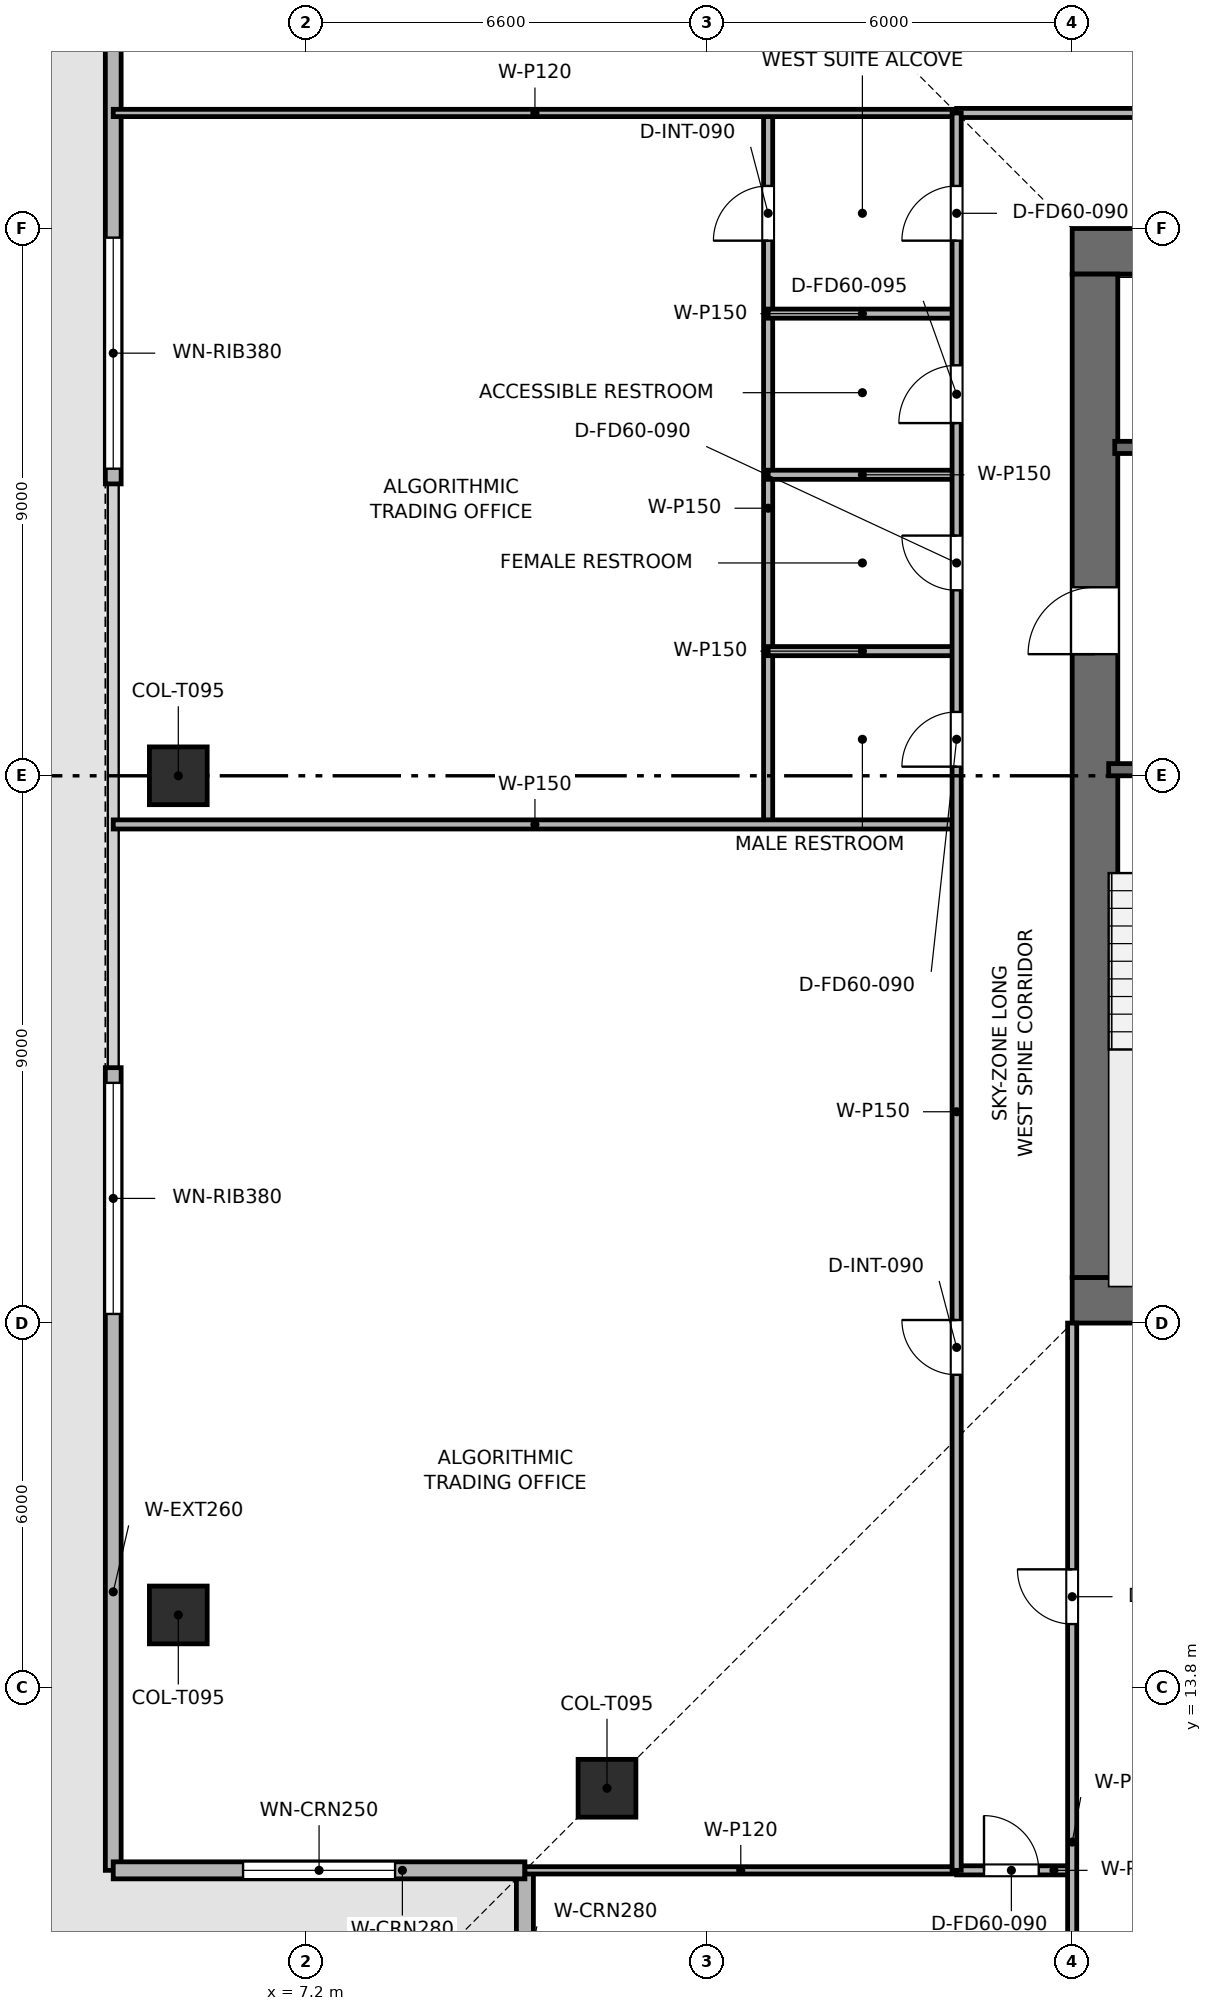
"""IFC4 building model, lengths in metres.
Left out: names, types, materials, properties, quantities, classifications, styles, units other than length and angle.
Written with IfcOpenShell. Run it as: python <this file> out.ifc"""

import sys

from ifc_helpers import new_model, si_unit, direction, frame, frame_2d, origin, origin_2d, place, context, subcontext, project, spatial, rectangle, extrude, element, fill, save


model = new_model("IFC4")
c1 = context("Model", 3, precision=1e-05, world=origin(), true_north=direction((0.0, 1.0)))
c2 = subcontext(c1, "Body", "Model", "MODEL_VIEW")
j1 = project(units=[si_unit("LENGTHUNIT", "METRE"), si_unit("PLANEANGLEUNIT", "RADIAN")], contexts=[c1])
p1 = place(None, origin())
s1 = spatial("IfcSite", under=j1, at=p1, CompositionType="ELEMENT")
p2 = place(p1, origin())
s2 = spatial("IfcBuilding", under=s1, at=p2, CompositionType="ELEMENT")
p3 = place(p2, frame((0.0, 0.0, 246.6)))
s3 = spatial("IfcBuildingStorey", under=s2, at=p3, CompositionType="ELEMENT", Elevation=246.6)
p4 = place(p3, frame((19.8, 20.175, 0.0), z_axis=(0.0, 0.0, 1.0), x_axis=(1.0, 0.0, 0.0)))
e1 = element("IfcWall", 1, at=p4, inside=s3, PredefinedType="SHEAR", context=c2, shape_type="SweptSolid", body=[
    extrude(rectangle(XDim=18.0, YDim=0.75, at=frame_2d((9.0, 0.0))), origin(), (0.0, 0.0, 1.0), 3.75),
])
p5 = place(p3, frame((19.8, 37.425, 0.0), z_axis=(0.0, 0.0, 1.0), x_axis=(1.0, 0.0, 0.0)))
e2 = element("IfcWall", 2, at=p5, inside=s3, PredefinedType="SHEAR", context=c2, shape_type="SweptSolid", body=[
    extrude(rectangle(XDim=18.0, YDim=0.75, at=frame_2d((9.0, 0.0))), origin(), (0.0, 0.0, 1.0), 3.75),
])
p6 = place(p5, frame((7.05, 0.0, 0.0)))
e3 = element("IfcOpeningElement", 3, at=p6, cuts=e2, PredefinedType="OPENING", context=c2, shape_type="SweptSolid", body=[
    extrude(rectangle(XDim=1.1, YDim=2.15, at=frame_2d((0.55, 1.075))), frame((0.0, 0.385, 0.0), z_axis=(0.0, -1.0, 0.0), x_axis=(1.0, 0.0, 0.0)), (0.0, 0.0, 1.0), 0.77),
])
p7 = place(p3, frame((20.175, 20.55, 0.0), z_axis=(0.0, 0.0, 1.0), x_axis=(0.0, 1.0, 0.0)))
e4 = element("IfcWall", 4, at=p7, inside=s3, PredefinedType="SHEAR", context=c2, shape_type="SweptSolid", body=[
    extrude(rectangle(XDim=16.5, YDim=0.75, at=frame_2d((8.25, 0.0))), origin(), (0.0, 0.0, 1.0), 3.75),
])
p8 = place(p7, frame((10.25, 0.0, 0.0)))
e5 = element("IfcOpeningElement", 5, at=p8, cuts=e4, PredefinedType="OPENING", context=c2, shape_type="SweptSolid", body=[
    extrude(rectangle(XDim=1.1, YDim=2.15, at=frame_2d((0.55, 1.075))), frame((0.0, 0.385, 0.0), z_axis=(0.0, -1.0, 0.0), x_axis=(1.0, 0.0, 0.0)), (0.0, 0.0, 1.0), 0.77),
])
for number, where, z_axis, x_axis in (
    (6, (5.1, 28.8, 0.003), (0.0, 0.0, 1.0), (1.0, 0.0, 0.0)),
    (7, (5.1, 15.0, 0.003), (0.0, 0.0, 1.0), (1.0, 0.0, 0.0)),
    (8, (12.15, 12.15, 0.003), (0.0, 0.0, 1.0), (1.0, 0.0, 0.0)),
):
    element("IfcColumn", number, at=place(p3, frame(where, z_axis=z_axis, x_axis=x_axis)), inside=s3, PredefinedType="COLUMN", context=c2, shape_type="SweptSolid", body=[
        extrude(rectangle(XDim=0.95, YDim=0.95, at=origin_2d()), origin(), (0.0, 0.0, 1.0), 3.494),
    ])
p9 = place(p3, frame((4.03, 10.8, 0.0), z_axis=(0.0, 0.0, 1.0), x_axis=(0.0, 1.0, 0.0)))
e9 = element("IfcWall", 9, at=p9, inside=s3, PredefinedType="SOLIDWALL", context=c2, shape_type="SweptSolid", body=[
    extrude(rectangle(XDim=13.2, YDim=0.26, at=frame_2d((6.6, 0.0))), origin(), (0.0, 0.0, 1.0), 3.5),
])
p10 = place(p9, frame((9.15, 0.0, 0.9)))
e10 = element("IfcOpeningElement", 10, at=p10, cuts=e9, PredefinedType="OPENING", context=c2, shape_type="SweptSolid", body=[
    extrude(rectangle(XDim=3.8, YDim=1.9, at=frame_2d((1.9, 0.95))), frame((0.0, 0.14, 0.0), z_axis=(0.0, -1.0, 0.0), x_axis=(1.0, 0.0, 0.0)), (0.0, 0.0, 1.0), 0.28),
])
p11 = place(p3, frame((4.03, 33.6, 0.0), z_axis=(0.0, 0.0, 1.0), x_axis=(0.0, 1.0, 0.0)))
e11 = element("IfcWall", 11, at=p11, inside=s3, PredefinedType="SOLIDWALL", context=c2, shape_type="SweptSolid", body=[
    extrude(rectangle(XDim=13.2, YDim=0.26, at=frame_2d((6.6, 0.0))), origin(), (0.0, 0.0, 1.0), 3.5),
])
p12 = place(p11, frame((0.25, 0.0, 0.9)))
e12 = element("IfcOpeningElement", 12, at=p12, cuts=e11, PredefinedType="OPENING", context=c2, shape_type="SweptSolid", body=[
    extrude(rectangle(XDim=3.8, YDim=1.9, at=frame_2d((1.9, 0.95))), frame((0.0, 0.14, 0.0), z_axis=(0.0, -1.0, 0.0), x_axis=(1.0, 0.0, 0.0)), (0.0, 0.0, 1.0), 0.28),
])
p13 = place(p3, frame((10.8, 4.03, 0.0), z_axis=(0.0, 0.0, 1.0), x_axis=(0.0, 1.0, 0.0)))
e13 = element("IfcWall", 13, at=p13, inside=s3, PredefinedType="SOLIDWALL", context=c2, shape_type="SweptSolid", body=[
    extrude(rectangle(XDim=6.77, YDim=0.28, at=frame_2d((3.385, 0.0))), origin(), (0.0, 0.0, 1.0), 3.5),
])
p14 = place(p13, frame((2.135, 0.0, 0.9)))
e14 = element("IfcOpeningElement", 14, at=p14, cuts=e13, PredefinedType="OPENING", context=c2, shape_type="SweptSolid", body=[
    extrude(rectangle(XDim=2.5, YDim=1.9, at=frame_2d((1.25, 0.95))), frame((0.0, 0.15, 0.0), z_axis=(0.0, -1.0, 0.0), x_axis=(1.0, 0.0, 0.0)), (0.0, 0.0, 1.0), 0.3),
])
p15 = place(p3, frame((10.8, 10.8, 0.0), z_axis=(0.0, 0.0, 1.0), x_axis=(-1.0, 0.0, 0.0)))
e15 = element("IfcWall", 15, at=p15, inside=s3, PredefinedType="SOLIDWALL", context=c2, shape_type="SweptSolid", body=[
    extrude(rectangle(XDim=6.77, YDim=0.28, at=frame_2d((3.385, 0.0))), origin(), (0.0, 0.0, 1.0), 3.5),
])
p16 = place(p15, frame((2.135, 0.0, 0.9)))
e16 = element("IfcOpeningElement", 16, at=p16, cuts=e15, PredefinedType="OPENING", context=c2, shape_type="SweptSolid", body=[
    extrude(rectangle(XDim=2.5, YDim=1.9, at=frame_2d((1.25, 0.95))), frame((0.0, 0.15, 0.0), z_axis=(0.0, -1.0, 0.0), x_axis=(1.0, 0.0, 0.0)), (0.0, 0.0, 1.0), 0.3),
])
p17 = place(p3, frame((20.4, 28.9, 0.0), z_axis=(0.0, 0.0, 1.0), x_axis=(1.0, 0.0, 0.0)))
e17 = element("IfcWall", 17, at=p17, inside=s3, PredefinedType="SHEAR", context=c2, shape_type="SweptSolid", body=[
    extrude(rectangle(XDim=3.15, YDim=0.2, at=frame_2d((1.575, 0.0))), origin(), (0.0, 0.0, 1.0), 3.5),
])
p18 = place(p17, frame((0.8, 0.0, 0.0)))
e18 = element("IfcOpeningElement", 18, at=p18, cuts=e17, PredefinedType="OPENING", context=c2, shape_type="SweptSolid", body=[
    extrude(rectangle(XDim=1.0, YDim=2.1, at=frame_2d((0.5, 1.05))), frame((0.0, 0.11, 0.0), z_axis=(0.0, -1.0, 0.0), x_axis=(1.0, 0.0, 0.0)), (0.0, 0.0, 1.0), 0.22),
])
p19 = place(p3, frame((20.5, 34.2, 0.0), z_axis=(0.0, 0.0, 1.0), x_axis=(1.0, 0.0, 0.0)))
e19 = element("IfcWall", 19, at=p19, inside=s3, PredefinedType="SHEAR", context=c2, shape_type="SweptSolid", body=[
    extrude(rectangle(XDim=3.05, YDim=0.2, at=frame_2d((1.525, 0.0))), origin(), (0.0, 0.0, 1.0), 3.5),
])
p20 = place(p19, frame((0.75, 0.0, 0.0)))
e20 = element("IfcOpeningElement", 20, at=p20, cuts=e19, PredefinedType="OPENING", context=c2, shape_type="SweptSolid", body=[
    extrude(rectangle(XDim=1.1, YDim=2.15, at=frame_2d((0.55, 1.075))), frame((0.0, 0.11, 0.0), z_axis=(0.0, -1.0, 0.0), x_axis=(1.0, 0.0, 0.0)), (0.0, 0.0, 1.0), 0.22),
])
p21 = place(p3, frame((14.8, 28.0, 0.0), z_axis=(0.0, 0.0, 1.0), x_axis=(0.0, 1.0, 0.0)))
e21 = element("IfcWall", 21, at=p21, inside=s3, PredefinedType="PARTITIONING", context=c2, shape_type="SweptSolid", body=[
    extrude(rectangle(XDim=11.7, YDim=0.15, at=frame_2d((5.85, 0.0))), origin(), (0.0, 0.0, 1.0), 3.085),
])
p22 = place(p21, frame((9.6, 0.0, 0.0)))
e22 = element("IfcOpeningElement", 22, at=p22, cuts=e21, PredefinedType="OPENING", context=c2, shape_type="SweptSolid", body=[
    extrude(rectangle(XDim=0.9, YDim=2.1, at=frame_2d((0.45, 1.05))), frame((0.0, 0.085, 0.0), z_axis=(0.0, -1.0, 0.0), x_axis=(1.0, 0.0, 0.0)), (0.0, 0.0, 1.0), 0.17),
])
p23 = place(p3, frame((4.03, 28.0, 0.0), z_axis=(0.0, 0.0, 1.0), x_axis=(1.0, 0.0, 0.0)))
e23 = element("IfcWall", 23, at=p23, inside=s3, PredefinedType="PARTITIONING", context=c2, shape_type="SweptSolid", body=[
    extrude(rectangle(XDim=13.87, YDim=0.15, at=frame_2d((6.935, 0.0))), origin(), (0.0, 0.0, 1.0), 3.085),
])
for number, where, z_axis, x_axis in (
    (24, (14.8, 36.4, 0.0), (0.0, 0.0, 1.0), (1.0, 0.0, 0.0)),
    (25, (14.8, 30.85, 0.0), (0.0, 0.0, 1.0), (1.0, 0.0, 0.0)),
    (26, (14.8, 33.75, 0.0), (0.0, 0.0, 1.0), (1.0, 0.0, 0.0)),
):
    element("IfcWall", number, at=place(p3, frame(where, z_axis=z_axis, x_axis=x_axis)), inside=s3, PredefinedType="PARTITIONING", context=c2, shape_type="SweptSolid", body=[
        extrude(rectangle(XDim=3.1, YDim=0.15, at=frame_2d((1.55, 0.0))), origin(), (0.0, 0.0, 1.0), 3.5),
    ])
p24 = place(p3, frame((10.8, 10.8, 0.0), z_axis=(0.0, 0.0, 1.0), x_axis=(1.0, 0.0, 0.0)))
e27 = element("IfcWall", 27, at=p24, inside=s3, PredefinedType="PARTITIONING", context=c2, shape_type="SweptSolid", body=[
    extrude(rectangle(XDim=7.1, YDim=0.12, at=frame_2d((3.55, 0.0))), origin(), (0.0, 0.0, 1.0), 3.085),
])
p25 = place(p3, frame((17.9, 10.8, 0.0), z_axis=(0.0, 0.0, 1.0), x_axis=(1.0, 0.0, 0.0)))
e28 = element("IfcWall", 28, at=p25, inside=s3, PredefinedType="PARTITIONING", context=c2, shape_type="SweptSolid", body=[
    extrude(rectangle(XDim=1.9, YDim=0.15, at=frame_2d((0.95, 0.0))), origin(), (0.0, 0.0, 1.0), 3.5),
])
p26 = place(p25, frame((0.45, 0.0, 0.0)))
e29 = element("IfcOpeningElement", 29, at=p26, cuts=e28, PredefinedType="OPENING", context=c2, shape_type="SweptSolid", body=[
    extrude(rectangle(XDim=0.9, YDim=2.1, at=frame_2d((0.45, 1.05))), frame((0.0, 0.085, 0.0), z_axis=(0.0, -1.0, 0.0), x_axis=(1.0, 0.0, 0.0)), (0.0, 0.0, 1.0), 0.17),
])
p27 = place(p3, frame((19.8, 4.03, 0.0), z_axis=(0.0, 0.0, 1.0), x_axis=(0.0, 1.0, 0.0)))
e30 = element("IfcWall", 30, at=p27, inside=s3, PredefinedType="PARTITIONING", context=c2, shape_type="SweptSolid", body=[
    extrude(rectangle(XDim=15.77, YDim=0.15, at=frame_2d((7.885, 0.0))), origin(), (0.0, 0.0, 1.0), 3.085),
])
p28 = place(p27, frame((10.82, 0.0, 0.0)))
e31 = element("IfcOpeningElement", 31, at=p28, cuts=e30, PredefinedType="OPENING", context=c2, shape_type="SweptSolid", body=[
    extrude(rectangle(XDim=0.9, YDim=2.1, at=frame_2d((0.45, 1.05))), frame((0.0, 0.085, 0.0), z_axis=(0.0, -1.0, 0.0), x_axis=(1.0, 0.0, 0.0)), (0.0, 0.0, 1.0), 0.17),
])
p29 = place(p3, frame((4.03, 39.7, 0.0), z_axis=(0.0, 0.0, 1.0), x_axis=(1.0, 0.0, 0.0)))
e32 = element("IfcWall", 32, at=p29, inside=s3, PredefinedType="PARTITIONING", context=c2, shape_type="SweptSolid", body=[
    extrude(rectangle(XDim=13.87, YDim=0.12, at=frame_2d((6.935, 0.0))), origin(), (0.0, 0.0, 1.0), 3.085),
])
p30 = place(p3, frame((17.9, 39.7, 0.0), z_axis=(0.0, 0.0, 1.0), x_axis=(1.0, 0.0, 0.0)))
e33 = element("IfcWall", 33, at=p30, inside=s3, PredefinedType="PARTITIONING", context=c2, shape_type="SweptSolid", body=[
    extrude(rectangle(XDim=21.8, YDim=0.15, at=frame_2d((10.9, 0.0))), origin(), (0.0, 0.0, 1.0), 3.085),
])
p31 = place(p30, frame((10.45, 0.0, 0.0)))
e34 = element("IfcOpeningElement", 34, at=p31, cuts=e33, PredefinedType="OPENING", context=c2, shape_type="SweptSolid", body=[
    extrude(rectangle(XDim=0.9, YDim=2.1, at=frame_2d((0.45, 1.05))), frame((0.0, 0.085, 0.0), z_axis=(0.0, -1.0, 0.0), x_axis=(1.0, 0.0, 0.0)), (0.0, 0.0, 1.0), 0.17),
])
p32 = place(p3, frame((17.9, 10.8, 0.0), z_axis=(0.0, 0.0, 1.0), x_axis=(0.0, 1.0, 0.0)))
e35 = element("IfcWall", 35, at=p32, inside=s3, PredefinedType="PARTITIONING", context=c2, shape_type="SweptSolid", body=[
    extrude(rectangle(XDim=28.9, YDim=0.15, at=frame_2d((14.45, 0.0))), origin(), (0.0, 0.0, 1.0), 3.085),
])
p33 = place(p32, frame((8.15, 0.0, 0.0)))
e36 = element("IfcOpeningElement", 36, at=p33, cuts=e35, PredefinedType="OPENING", context=c2, shape_type="SweptSolid", body=[
    extrude(rectangle(XDim=0.9, YDim=2.1, at=frame_2d((0.45, 1.05))), frame((0.0, 0.085, 0.0), z_axis=(0.0, -1.0, 0.0), x_axis=(1.0, 0.0, 0.0)), (0.0, 0.0, 1.0), 0.17),
])
p34 = place(p32, frame((18.15, 0.0, 0.0)))
e37 = element("IfcOpeningElement", 37, at=p34, cuts=e35, PredefinedType="OPENING", context=c2, shape_type="SweptSolid", body=[
    extrude(rectangle(XDim=0.9, YDim=2.1, at=frame_2d((0.45, 1.05))), frame((0.0, 0.085, 0.0), z_axis=(0.0, -1.0, 0.0), x_axis=(1.0, 0.0, 0.0)), (0.0, 0.0, 1.0), 0.17),
])
p35 = place(p32, frame((21.05, 0.0, 0.0)))
e38 = element("IfcOpeningElement", 38, at=p35, cuts=e35, PredefinedType="OPENING", context=c2, shape_type="SweptSolid", body=[
    extrude(rectangle(XDim=0.9, YDim=2.1, at=frame_2d((0.45, 1.05))), frame((0.0, 0.085, 0.0), z_axis=(0.0, -1.0, 0.0), x_axis=(1.0, 0.0, 0.0)), (0.0, 0.0, 1.0), 0.17),
])
p36 = place(p32, frame((23.8, 0.0, 0.0)))
e39 = element("IfcOpeningElement", 39, at=p36, cuts=e35, PredefinedType="OPENING", context=c2, shape_type="SweptSolid", body=[
    extrude(rectangle(XDim=0.95, YDim=2.1, at=frame_2d((0.475, 1.05))), frame((0.0, 0.085, 0.0), z_axis=(0.0, -1.0, 0.0), x_axis=(1.0, 0.0, 0.0)), (0.0, 0.0, 1.0), 0.17),
])
p37 = place(p32, frame((26.8, 0.0, 0.0)))
e40 = element("IfcOpeningElement", 40, at=p37, cuts=e35, PredefinedType="OPENING", context=c2, shape_type="SweptSolid", body=[
    extrude(rectangle(XDim=0.9, YDim=2.1, at=frame_2d((0.45, 1.05))), frame((0.0, 0.085, 0.0), z_axis=(0.0, -1.0, 0.0), x_axis=(1.0, 0.0, 0.0)), (0.0, 0.0, 1.0), 0.17),
])
p38 = place(p10, origin())
e41 = element("IfcWindow", 41, at=p38, inside=s3, PartitioningType="SINGLE_PANEL", PredefinedType="WINDOW", context=c2, shape_type="SweptSolid", body=[
    extrude(rectangle(XDim=3.8, YDim=1.9, at=frame_2d((1.9, 0.95))), frame((0.0, 0.03, 0.0), z_axis=(0.0, -1.0, 0.0), x_axis=(1.0, 0.0, 0.0)), (0.0, 0.0, 1.0), 0.06),
])
fill(e10, e41)
p39 = place(p12, origin())
e42 = element("IfcWindow", 42, at=p39, inside=s3, PartitioningType="SINGLE_PANEL", PredefinedType="WINDOW", context=c2, shape_type="SweptSolid", body=[
    extrude(rectangle(XDim=3.8, YDim=1.9, at=frame_2d((1.9, 0.95))), frame((0.0, 0.03, 0.0), z_axis=(0.0, -1.0, 0.0), x_axis=(1.0, 0.0, 0.0)), (0.0, 0.0, 1.0), 0.06),
])
fill(e12, e42)
p40 = place(p16, origin())
e43 = element("IfcWindow", 43, at=p40, inside=s3, PartitioningType="SINGLE_PANEL", PredefinedType="WINDOW", context=c2, shape_type="SweptSolid", body=[
    extrude(rectangle(XDim=2.5, YDim=1.9, at=frame_2d((1.25, 0.95))), frame((0.0, 0.03, 0.0), z_axis=(0.0, -1.0, 0.0), x_axis=(1.0, 0.0, 0.0)), (0.0, 0.0, 1.0), 0.06),
])
fill(e16, e43)
p41 = place(p22, origin())
e44 = element("IfcDoor", 44, at=p41, inside=s3, OperationType="SINGLE_SWING_LEFT", PredefinedType="DOOR", context=c2, shape_type="SweptSolid", body=[
    extrude(rectangle(XDim=0.9, YDim=2.1, at=frame_2d((0.45, 1.05))), frame((0.0, 0.025, 0.0), z_axis=(0.0, -1.0, 0.0), x_axis=(1.0, 0.0, 0.0)), (0.0, 0.0, 1.0), 0.05),
])
fill(e22, e44)
p42 = place(p26, origin())
e45 = element("IfcDoor", 45, at=p42, inside=s3, OperationType="SINGLE_SWING_LEFT", PredefinedType="DOOR", context=c2, shape_type="SweptSolid", body=[
    extrude(rectangle(XDim=0.9, YDim=2.1, at=frame_2d((0.45, 1.05))), frame((0.0, 0.025, 0.0), z_axis=(0.0, -1.0, 0.0), x_axis=(1.0, 0.0, 0.0)), (0.0, 0.0, 1.0), 0.05),
])
fill(e29, e45)
p43 = place(p28, origin())
e46 = element("IfcDoor", 46, at=p43, inside=s3, OperationType="SINGLE_SWING_RIGHT", PredefinedType="DOOR", context=c2, shape_type="SweptSolid", body=[
    extrude(rectangle(XDim=0.9, YDim=2.1, at=frame_2d((0.45, 1.05))), frame((0.0, 0.025, 0.0), z_axis=(0.0, -1.0, 0.0), x_axis=(1.0, 0.0, 0.0)), (0.0, 0.0, 1.0), 0.05),
])
fill(e31, e46)
p44 = place(p33, origin())
e47 = element("IfcDoor", 47, at=p44, inside=s3, OperationType="SINGLE_SWING_RIGHT", PredefinedType="DOOR", context=c2, shape_type="SweptSolid", body=[
    extrude(rectangle(XDim=0.9, YDim=2.1, at=frame_2d((0.45, 1.05))), frame((0.0, 0.025, 0.0), z_axis=(0.0, -1.0, 0.0), x_axis=(1.0, 0.0, 0.0)), (0.0, 0.0, 1.0), 0.05),
])
fill(e36, e47)
p45 = place(p34, origin())
e48 = element("IfcDoor", 48, at=p45, inside=s3, OperationType="SINGLE_SWING_LEFT", PredefinedType="DOOR", context=c2, shape_type="SweptSolid", body=[
    extrude(rectangle(XDim=0.9, YDim=2.1, at=frame_2d((0.45, 1.05))), frame((0.0, 0.025, 0.0), z_axis=(0.0, -1.0, 0.0), x_axis=(1.0, 0.0, 0.0)), (0.0, 0.0, 1.0), 0.05),
])
fill(e37, e48)
p46 = place(p35, origin())
e49 = element("IfcDoor", 49, at=p46, inside=s3, OperationType="SINGLE_SWING_RIGHT", PredefinedType="DOOR", context=c2, shape_type="SweptSolid", body=[
    extrude(rectangle(XDim=0.9, YDim=2.1, at=frame_2d((0.45, 1.05))), frame((0.0, 0.025, 0.0), z_axis=(0.0, -1.0, 0.0), x_axis=(1.0, 0.0, 0.0)), (0.0, 0.0, 1.0), 0.05),
])
fill(e38, e49)
p47 = place(p36, origin())
e50 = element("IfcDoor", 50, at=p47, inside=s3, OperationType="SINGLE_SWING_LEFT", PredefinedType="DOOR", context=c2, shape_type="SweptSolid", body=[
    extrude(rectangle(XDim=0.95, YDim=2.1, at=frame_2d((0.475, 1.05))), frame((0.0, 0.025, 0.0), z_axis=(0.0, -1.0, 0.0), x_axis=(1.0, 0.0, 0.0)), (0.0, 0.0, 1.0), 0.05),
])
fill(e39, e50)
p48 = place(p37, origin())
e51 = element("IfcDoor", 51, at=p48, inside=s3, OperationType="SINGLE_SWING_LEFT", PredefinedType="DOOR", context=c2, shape_type="SweptSolid", body=[
    extrude(rectangle(XDim=0.9, YDim=2.1, at=frame_2d((0.45, 1.05))), frame((0.0, 0.025, 0.0), z_axis=(0.0, -1.0, 0.0), x_axis=(1.0, 0.0, 0.0)), (0.0, 0.0, 1.0), 0.05),
])
fill(e40, e51)
p49 = place(p8, origin())
e52 = element("IfcDoor", 52, at=p49, inside=s3, OperationType="SINGLE_SWING_LEFT", PredefinedType="DOOR", context=c2, shape_type="SweptSolid", body=[
    extrude(rectangle(XDim=1.1, YDim=2.15, at=frame_2d((0.55, 1.075))), frame((0.0, 0.025, 0.0), z_axis=(0.0, -1.0, 0.0), x_axis=(1.0, 0.0, 0.0)), (0.0, 0.0, 1.0), 0.05),
])
fill(e5, e52)
save(model, sys.argv[1])
